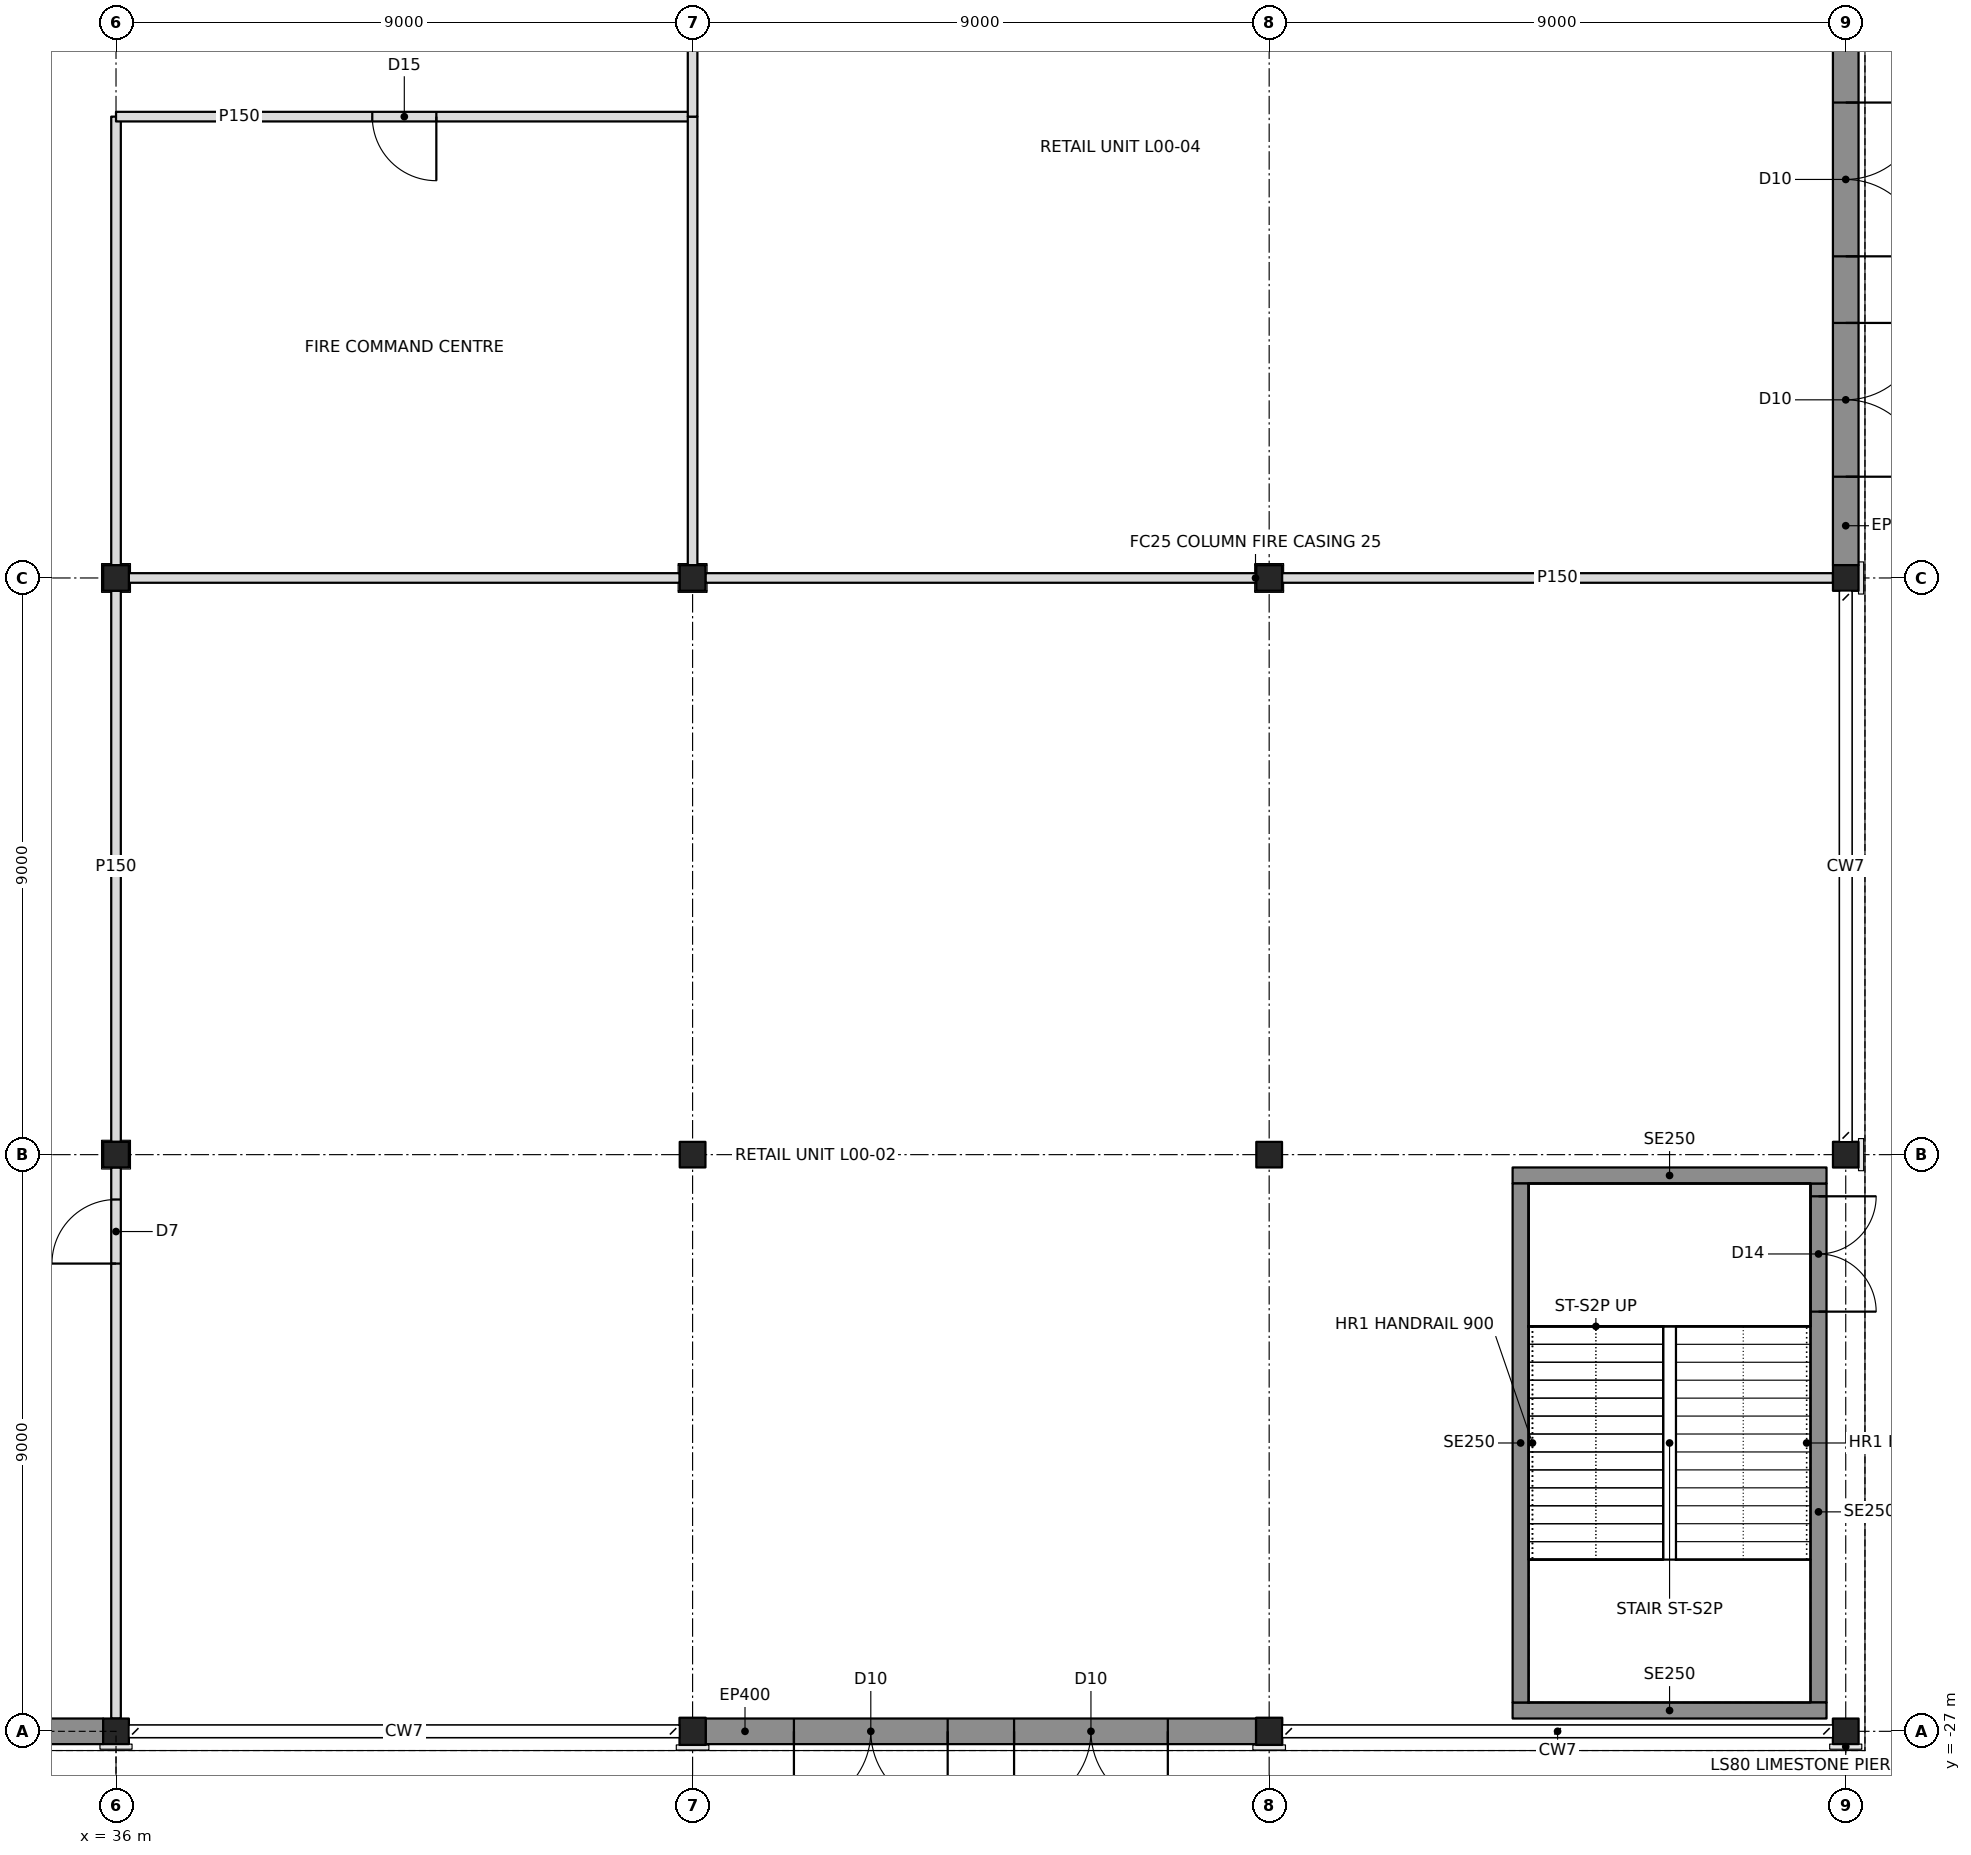
"""IFC4 building model, lengths in metres.
Left out: names, types, materials, properties, quantities, classifications, styles, units other than length and angle.
Written with IfcOpenShell. Run it as: python <this file> out.ifc"""

import sys

from ifc_helpers import new_model, si_unit, direction, frame, frame_2d, origin, origin_2d, place, context, subcontext, project, spatial, rectangle, i_section, extrude, element, fill, save


model = new_model("IFC4")
c1 = context("Model", 3, precision=1e-05, world=origin(), true_north=direction((0.0, 1.0)))
c2 = subcontext(c1, "Body", "Model", "MODEL_VIEW")
j1 = project(units=[si_unit("LENGTHUNIT", "METRE"), si_unit("PLANEANGLEUNIT", "RADIAN")], contexts=[c1])
p1 = place(None, origin())
s1 = spatial("IfcSite", under=j1, at=p1, CompositionType="ELEMENT")
p2 = place(p1, origin())
s2 = spatial("IfcBuilding", under=s1, at=p2, CompositionType="ELEMENT")
p3 = place(p2, origin())
s3 = spatial("IfcBuildingStorey", under=s2, at=p3, CompositionType="ELEMENT", Elevation=0.0)
for number, where, z_axis, x_axis in (
    (1, (36.0, -27.0, 0.0), (0.0, 0.0, 1.0), (1.0, 0.0, 0.0)),
    (2, (36.0, -18.0, 0.0), (0.0, 0.0, 1.0), (1.0, 0.0, 0.0)),
    (3, (36.0, -9.0, 0.0), (0.0, 0.0, 1.0), (1.0, 0.0, 0.0)),
):
    element("IfcColumn", number, at=place(p3, frame(where, z_axis=z_axis, x_axis=x_axis)), inside=s3, PredefinedType="COLUMN", context=c2, shape_type="SweptSolid", body=[
        extrude(i_section(OverallWidth=0.401, OverallDepth=0.399, WebThickness=0.025, FlangeThickness=0.04, at=origin_2d()), origin(), (0.0, 0.0, 1.0), 6.0),
    ])
p4 = place(p3, frame((45.0, -27.0, 0.0), z_axis=(0.0, 0.0, 1.0), x_axis=(1.0, 0.0, 0.0)))
e4 = element("IfcColumn", 4, at=p4, inside=s3, PredefinedType="COLUMN", context=c2, shape_type="SweptSolid", body=[
    extrude(i_section(OverallWidth=0.409, OverallDepth=0.424, WebThickness=0.033, FlangeThickness=0.052, at=origin_2d()), origin(), (0.0, 0.0, 1.0), 6.0),
])
for number, where, z_axis, x_axis in (
    (5, (45.0, -18.0, 0.0), (0.0, 0.0, 1.0), (1.0, 0.0, 0.0)),
    (6, (45.0, -9.0, 0.0), (0.0, 0.0, 1.0), (1.0, 0.0, 0.0)),
):
    element("IfcColumn", number, at=place(p3, frame(where, z_axis=z_axis, x_axis=x_axis)), inside=s3, PredefinedType="COLUMN", context=c2, shape_type="SweptSolid", body=[
        extrude(i_section(OverallWidth=0.401, OverallDepth=0.399, WebThickness=0.025, FlangeThickness=0.04, at=origin_2d()), origin(), (0.0, 0.0, 1.0), 6.0),
    ])
p5 = place(p3, frame((54.0, -27.0, 0.0), z_axis=(0.0, 0.0, 1.0), x_axis=(1.0, 0.0, 0.0)))
e7 = element("IfcColumn", 7, at=p5, inside=s3, PredefinedType="COLUMN", context=c2, shape_type="SweptSolid", body=[
    extrude(i_section(OverallWidth=0.409, OverallDepth=0.424, WebThickness=0.033, FlangeThickness=0.052, at=origin_2d()), origin(), (0.0, 0.0, 1.0), 6.0),
])
for number, where, z_axis, x_axis in (
    (8, (54.0, -18.0, 0.0), (0.0, 0.0, 1.0), (1.0, 0.0, 0.0)),
    (9, (54.0, -9.0, 0.0), (0.0, 0.0, 1.0), (1.0, 0.0, 0.0)),
    (10, (63.0, -27.0, 0.0), (0.0, 0.0, 1.0), (1.0, 0.0, 0.0)),
    (11, (63.0, -18.0, 0.0), (0.0, 0.0, 1.0), (0.0, 1.0, 0.0)),
    (12, (63.0, -9.0, 0.0), (0.0, 0.0, 1.0), (0.0, 1.0, 0.0)),
):
    element("IfcColumn", number, at=place(p3, frame(where, z_axis=z_axis, x_axis=x_axis)), inside=s3, PredefinedType="COLUMN", context=c2, shape_type="SweptSolid", body=[
        extrude(i_section(OverallWidth=0.401, OverallDepth=0.399, WebThickness=0.025, FlangeThickness=0.04, at=origin_2d()), origin(), (0.0, 0.0, 1.0), 6.0),
    ])
p6 = place(p3, frame((27.201, -27.0, 0.0), z_axis=(0.0, 0.0, 1.0), x_axis=(1.0, 0.0, 0.0)))
e13 = element("IfcWall", 13, at=p6, inside=s3, PredefinedType="SOLIDWALL", context=c2, shape_type="SweptSolid", body=[
    extrude(rectangle(XDim=8.599, YDim=0.4, at=frame_2d((4.299, 0.0))), origin(), (0.0, 0.0, 1.0), 5.054),
])
p7 = place(p6, frame((1.38, 0.0, 0.0)))
e14 = element("IfcOpeningElement", 14, at=p7, cuts=e13, PredefinedType="OPENING", context=c2, shape_type="SweptSolid", body=[
    extrude(rectangle(XDim=2.4, YDim=2.7, at=frame_2d((1.2, 1.35))), frame((0.0, 0.21, 0.0), z_axis=(0.0, -1.0, 0.0), x_axis=(1.0, 0.0, 0.0)), (0.0, 0.0, 1.0), 0.42),
])
p8 = place(p6, frame((4.819, 0.0, 0.0)))
e15 = element("IfcOpeningElement", 15, at=p8, cuts=e13, PredefinedType="OPENING", context=c2, shape_type="SweptSolid", body=[
    extrude(rectangle(XDim=2.4, YDim=2.7, at=frame_2d((1.2, 1.35))), frame((0.0, 0.21, 0.0), z_axis=(0.0, -1.0, 0.0), x_axis=(1.0, 0.0, 0.0)), (0.0, 0.0, 1.0), 0.42),
])
p9 = place(p3, frame((45.205, -27.0, 0.0), z_axis=(0.0, 0.0, 1.0), x_axis=(1.0, 0.0, 0.0)))
e16 = element("IfcWall", 16, at=p9, inside=s3, PredefinedType="SOLIDWALL", context=c2, shape_type="SweptSolid", body=[
    extrude(rectangle(XDim=8.591, YDim=0.4, at=frame_2d((4.295, 0.0))), origin(), (0.0, 0.0, 1.0), 5.054),
])
p10 = place(p9, frame((1.377, 0.0, 0.0)))
e17 = element("IfcOpeningElement", 17, at=p10, cuts=e16, PredefinedType="OPENING", context=c2, shape_type="SweptSolid", body=[
    extrude(rectangle(XDim=2.4, YDim=2.7, at=frame_2d((1.2, 1.35))), frame((0.0, 0.21, 0.0), z_axis=(0.0, -1.0, 0.0), x_axis=(1.0, 0.0, 0.0)), (0.0, 0.0, 1.0), 0.42),
])
p11 = place(p9, frame((4.814, 0.0, 0.0)))
e18 = element("IfcOpeningElement", 18, at=p11, cuts=e16, PredefinedType="OPENING", context=c2, shape_type="SweptSolid", body=[
    extrude(rectangle(XDim=2.4, YDim=2.7, at=frame_2d((1.2, 1.35))), frame((0.0, 0.21, 0.0), z_axis=(0.0, -1.0, 0.0), x_axis=(1.0, 0.0, 0.0)), (0.0, 0.0, 1.0), 0.42),
])
p12 = place(p3, frame((63.0, -8.799, 0.0), z_axis=(0.0, 0.0, 1.0), x_axis=(0.0, 1.0, 0.0)))
e19 = element("IfcWall", 19, at=p12, inside=s3, PredefinedType="SOLIDWALL", context=c2, shape_type="SweptSolid", body=[
    extrude(rectangle(XDim=8.599, YDim=0.4, at=frame_2d((4.299, 0.0))), origin(), (0.0, 0.0, 1.0), 5.054),
])
p13 = place(p12, frame((1.38, 0.0, 0.0)))
e20 = element("IfcOpeningElement", 20, at=p13, cuts=e19, PredefinedType="OPENING", context=c2, shape_type="SweptSolid", body=[
    extrude(rectangle(XDim=2.4, YDim=2.7, at=frame_2d((1.2, 1.35))), frame((0.0, 0.21, 0.0), z_axis=(0.0, -1.0, 0.0), x_axis=(1.0, 0.0, 0.0)), (0.0, 0.0, 1.0), 0.42),
])
p14 = place(p12, frame((4.819, 0.0, 0.0)))
e21 = element("IfcOpeningElement", 21, at=p14, cuts=e19, PredefinedType="OPENING", context=c2, shape_type="SweptSolid", body=[
    extrude(rectangle(XDim=2.4, YDim=2.7, at=frame_2d((1.2, 1.35))), frame((0.0, 0.21, 0.0), z_axis=(0.0, -1.0, 0.0), x_axis=(1.0, 0.0, 0.0)), (0.0, 0.0, 1.0), 0.42),
])
p15 = place(p3, frame((36.0, -26.801, 0.0), z_axis=(0.0, 0.0, 1.0), x_axis=(0.0, 1.0, 0.0)))
e22 = element("IfcWall", 22, at=p15, inside=s3, PredefinedType="PARTITIONING", context=c2, shape_type="SweptSolid", body=[
    extrude(rectangle(XDim=8.601, YDim=0.15, at=frame_2d((4.301, 0.0))), origin(), (0.0, 0.0, 1.0), 4.892),
])
p16 = place(p15, frame((7.101, 0.0, 0.0)))
e23 = element("IfcOpeningElement", 23, at=p16, cuts=e22, PredefinedType="OPENING", context=c2, shape_type="SweptSolid", body=[
    extrude(rectangle(XDim=1.0, YDim=2.1, at=frame_2d((0.5, 1.05))), frame((0.0, 0.085, 0.0), z_axis=(0.0, -1.0, 0.0), x_axis=(1.0, 0.0, 0.0)), (0.0, 0.0, 1.0), 0.17),
])
p17 = place(p3, frame((36.0, -17.801, 0.0), z_axis=(0.0, 0.0, 1.0), x_axis=(0.0, 1.0, 0.0)))
e24 = element("IfcWall", 24, at=p17, inside=s3, PredefinedType="PARTITIONING", context=c2, shape_type="SweptSolid", body=[
    extrude(rectangle(XDim=8.601, YDim=0.15, at=frame_2d((4.301, 0.0))), origin(), (0.0, 0.0, 1.0), 4.892),
])
p18 = place(p3, frame((36.201, -9.0, 0.0), z_axis=(0.0, 0.0, 1.0), x_axis=(1.0, 0.0, 0.0)))
e25 = element("IfcWall", 25, at=p18, inside=s3, PredefinedType="PARTITIONING", context=c2, shape_type="SweptSolid", body=[
    extrude(rectangle(XDim=8.599, YDim=0.15, at=frame_2d((4.299, 0.0))), origin(), (0.0, 0.0, 1.0), 4.892),
])
p19 = place(p3, frame((36.0, -8.801, 0.0), z_axis=(0.0, 0.0, 1.0), x_axis=(0.0, 1.0, 0.0)))
e26 = element("IfcWall", 26, at=p19, inside=s3, PredefinedType="PARTITIONING", context=c2, shape_type="SweptSolid", body=[
    extrude(rectangle(XDim=7.0, YDim=0.15, at=frame_2d((3.5, 0.0))), origin(), (0.0, 0.0, 1.0), 4.892),
])
p20 = place(p3, frame((36.0, -1.8, 0.0), z_axis=(0.0, 0.0, 1.0), x_axis=(1.0, 0.0, 0.0)))
e27 = element("IfcWall", 27, at=p20, inside=s3, PredefinedType="PARTITIONING", context=c2, shape_type="SweptSolid", body=[
    extrude(rectangle(XDim=9.0, YDim=0.15, at=frame_2d((4.5, 0.0))), origin(), (0.0, 0.0, 1.0), 4.891),
])
p21 = place(p20, frame((4.0, 0.0, 0.0)))
e28 = element("IfcOpeningElement", 28, at=p21, cuts=e27, PredefinedType="OPENING", context=c2, shape_type="SweptSolid", body=[
    extrude(rectangle(XDim=1.0, YDim=2.1, at=frame_2d((0.5, 1.05))), frame((0.0, 0.085, 0.0), z_axis=(0.0, -1.0, 0.0), x_axis=(1.0, 0.0, 0.0)), (0.0, 0.0, 1.0), 0.17),
])
p22 = place(p3, frame((45.201, -9.0, 0.0), z_axis=(0.0, 0.0, 1.0), x_axis=(1.0, 0.0, 0.0)))
e29 = element("IfcWall", 29, at=p22, inside=s3, PredefinedType="PARTITIONING", context=c2, shape_type="SweptSolid", body=[
    extrude(rectangle(XDim=8.599, YDim=0.15, at=frame_2d((4.299, 0.0))), origin(), (0.0, 0.0, 1.0), 4.892),
])
p23 = place(p3, frame((54.201, -9.0, 0.0), z_axis=(0.0, 0.0, 1.0), x_axis=(1.0, 0.0, 0.0)))
e30 = element("IfcWall", 30, at=p23, inside=s3, PredefinedType="PARTITIONING", context=c2, shape_type="SweptSolid", body=[
    extrude(rectangle(XDim=8.6, YDim=0.15, at=frame_2d((4.3, 0.0))), origin(), (0.0, 0.0, 1.0), 4.892),
])
p24 = place(p3, frame((45.0, -1.8, 0.0), z_axis=(0.0, 0.0, 1.0), x_axis=(0.0, -1.0, 0.0)))
e31 = element("IfcWall", 31, at=p24, inside=s3, PredefinedType="PARTITIONING", context=c2, shape_type="SweptSolid", body=[
    extrude(rectangle(XDim=7.0, YDim=0.15, at=frame_2d((3.5, 0.0))), origin(), (0.0, 0.0, 1.0), 4.892),
])
p25 = place(p3, frame((45.0, -1.8, 0.0), z_axis=(0.0, 0.0, 1.0), x_axis=(0.0, 1.0, 0.0)))
e32 = element("IfcWall", 32, at=p25, inside=s3, PredefinedType="PARTITIONING", context=c2, shape_type="SweptSolid", body=[
    extrude(rectangle(XDim=1.4, YDim=0.15, at=frame_2d((0.7, 0.0))), origin(), (0.0, 0.0, 1.0), 4.892),
])
for number, where, z_axis, x_axis in (
    (33, (57.8, -26.675, 0.0), (0.0, 0.0, 1.0), (1.0, 0.0, 0.0)),
    (34, (57.8, -18.325, 0.0), (0.0, 0.0, 1.0), (1.0, 0.0, 0.0)),
):
    element("IfcWall", number, at=place(p3, frame(where, z_axis=z_axis, x_axis=x_axis)), inside=s3, PredefinedType="SOLIDWALL", context=c2, shape_type="SweptSolid", body=[
        extrude(rectangle(XDim=4.9, YDim=0.25, at=frame_2d((2.45, 0.0))), origin(), (0.0, 0.0, 1.0), 5.75),
    ])
p26 = place(p3, frame((57.925, -26.55, 0.0), z_axis=(0.0, 0.0, 1.0), x_axis=(0.0, 1.0, 0.0)))
e35 = element("IfcWall", 35, at=p26, inside=s3, PredefinedType="SOLIDWALL", context=c2, shape_type="SweptSolid", body=[
    extrude(rectangle(XDim=8.1, YDim=0.25, at=frame_2d((4.05, 0.0))), origin(), (0.0, 0.0, 1.0), 5.75),
])
p27 = place(p3, frame((62.575, -26.55, 0.0), z_axis=(0.0, 0.0, 1.0), x_axis=(0.0, 1.0, 0.0)))
e36 = element("IfcWall", 36, at=p27, inside=s3, PredefinedType="SOLIDWALL", context=c2, shape_type="SweptSolid", body=[
    extrude(rectangle(XDim=8.1, YDim=0.25, at=frame_2d((4.05, 0.0))), origin(), (0.0, 0.0, 1.0), 5.75),
])
p28 = place(p27, frame((6.1, 0.0, 0.0)))
e37 = element("IfcOpeningElement", 37, at=p28, cuts=e36, PredefinedType="OPENING", context=c2, shape_type="SweptSolid", body=[
    extrude(rectangle(XDim=1.8, YDim=2.1, at=frame_2d((0.9, 1.05))), frame((0.0, 0.135, 0.0), z_axis=(0.0, -1.0, 0.0), x_axis=(1.0, 0.0, 0.0)), (0.0, 0.0, 1.0), 0.27),
])
p29 = place(p10, frame((2.4, 0.0, 0.0), z_axis=(0.0, 0.0, 1.0), x_axis=(-1.0, 0.0, 0.0)))
e38 = element("IfcDoor", 38, at=p29, inside=s3, OperationType="DOUBLE_DOOR_SINGLE_SWING", PredefinedType="DOOR", context=c2, shape_type="SweptSolid", body=[
    extrude(rectangle(XDim=2.4, YDim=2.7, at=frame_2d((1.2, 1.35))), frame((0.0, 0.025, 0.0), z_axis=(0.0, -1.0, 0.0), x_axis=(1.0, 0.0, 0.0)), (0.0, 0.0, 1.0), 0.05),
])
fill(e17, e38)
p30 = place(p11, frame((2.4, 0.0, 0.0), z_axis=(0.0, 0.0, 1.0), x_axis=(-1.0, 0.0, 0.0)))
e39 = element("IfcDoor", 39, at=p30, inside=s3, OperationType="DOUBLE_DOOR_SINGLE_SWING", PredefinedType="DOOR", context=c2, shape_type="SweptSolid", body=[
    extrude(rectangle(XDim=2.4, YDim=2.7, at=frame_2d((1.2, 1.35))), frame((0.0, 0.025, 0.0), z_axis=(0.0, -1.0, 0.0), x_axis=(1.0, 0.0, 0.0)), (0.0, 0.0, 1.0), 0.05),
])
fill(e18, e39)
p31 = place(p13, frame((2.4, 0.0, 0.0), z_axis=(0.0, 0.0, 1.0), x_axis=(-1.0, 0.0, 0.0)))
e40 = element("IfcDoor", 40, at=p31, inside=s3, OperationType="DOUBLE_DOOR_SINGLE_SWING", PredefinedType="DOOR", context=c2, shape_type="SweptSolid", body=[
    extrude(rectangle(XDim=2.4, YDim=2.7, at=frame_2d((1.2, 1.35))), frame((0.0, 0.025, 0.0), z_axis=(0.0, -1.0, 0.0), x_axis=(1.0, 0.0, 0.0)), (0.0, 0.0, 1.0), 0.05),
])
fill(e20, e40)
p32 = place(p14, frame((2.4, 0.0, 0.0), z_axis=(0.0, 0.0, 1.0), x_axis=(-1.0, 0.0, 0.0)))
e41 = element("IfcDoor", 41, at=p32, inside=s3, OperationType="DOUBLE_DOOR_SINGLE_SWING", PredefinedType="DOOR", context=c2, shape_type="SweptSolid", body=[
    extrude(rectangle(XDim=2.4, YDim=2.7, at=frame_2d((1.2, 1.35))), frame((0.0, 0.025, 0.0), z_axis=(0.0, -1.0, 0.0), x_axis=(1.0, 0.0, 0.0)), (0.0, 0.0, 1.0), 0.05),
])
fill(e21, e41)
p33 = place(p16, origin())
e42 = element("IfcDoor", 42, at=p33, inside=s3, OperationType="SINGLE_SWING_LEFT", PredefinedType="DOOR", context=c2, shape_type="SweptSolid", body=[
    extrude(rectangle(XDim=1.0, YDim=2.1, at=frame_2d((0.5, 1.05))), frame((0.0, 0.025, 0.0), z_axis=(0.0, -1.0, 0.0), x_axis=(1.0, 0.0, 0.0)), (0.0, 0.0, 1.0), 0.05),
])
fill(e23, e42)
p34 = place(p21, frame((1.0, 0.0, 0.0), z_axis=(0.0, 0.0, 1.0), x_axis=(-1.0, 0.0, 0.0)))
e43 = element("IfcDoor", 43, at=p34, inside=s3, OperationType="SINGLE_SWING_LEFT", PredefinedType="DOOR", context=c2, shape_type="SweptSolid", body=[
    extrude(rectangle(XDim=1.0, YDim=2.1, at=frame_2d((0.5, 1.05))), frame((0.0, 0.025, 0.0), z_axis=(0.0, -1.0, 0.0), x_axis=(1.0, 0.0, 0.0)), (0.0, 0.0, 1.0), 0.05),
])
fill(e28, e43)
p35 = place(p28, frame((1.8, 0.0, 0.0), z_axis=(0.0, 0.0, 1.0), x_axis=(-1.0, 0.0, 0.0)))
e44 = element("IfcDoor", 44, at=p35, inside=s3, OperationType="DOUBLE_DOOR_SINGLE_SWING", PredefinedType="DOOR", context=c2, shape_type="SweptSolid", body=[
    extrude(rectangle(XDim=1.8, YDim=2.1, at=frame_2d((0.9, 1.05))), frame((0.0, 0.025, 0.0), z_axis=(0.0, -1.0, 0.0), x_axis=(1.0, 0.0, 0.0)), (0.0, 0.0, 1.0), 0.05),
])
fill(e37, e44)
save(model, sys.argv[1])
